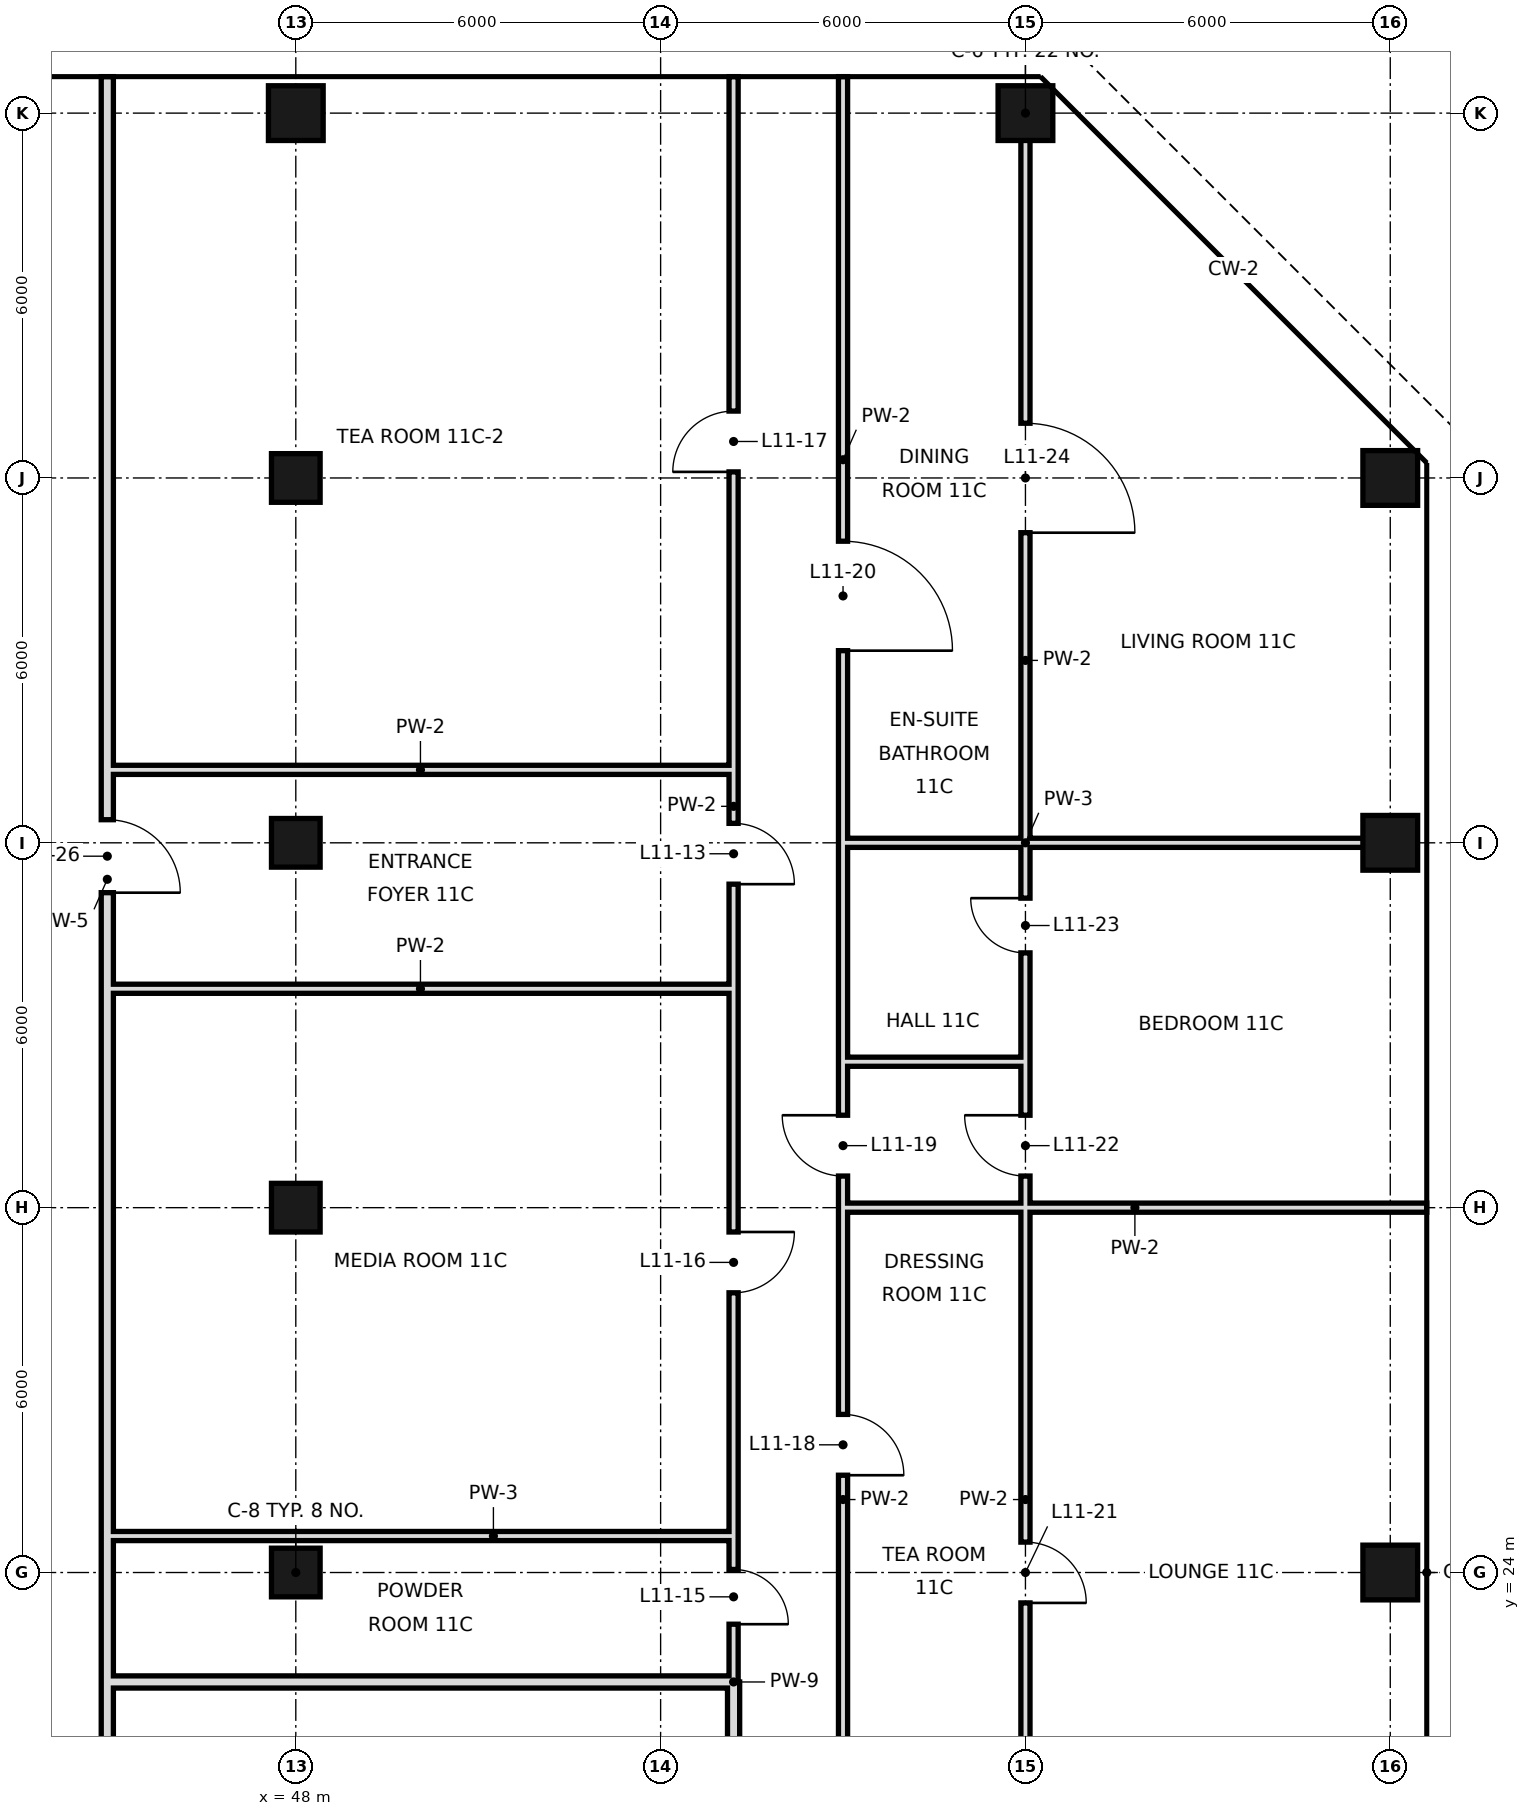
"""IFC4 building model, lengths in metres.
Left out: names, types, materials, properties, quantities, classifications, styles, units other than length and angle.
Written with IfcOpenShell. Run it as: python <this file> out.ifc"""

import sys

from ifc_helpers import new_model, si_unit, direction, frame, frame_2d, origin, origin_2d, place, context, subcontext, project, spatial, rectangle, hollow_rectangle, extrude, element, fill, save


model = new_model("IFC4")
c1 = context("Model", 3, precision=1e-05, world=origin(), true_north=direction((0.0, 1.0)))
c2 = subcontext(c1, "Body", "Model", "MODEL_VIEW")
j1 = project(units=[si_unit("LENGTHUNIT", "METRE"), si_unit("PLANEANGLEUNIT", "RADIAN")], contexts=[c1])
p1 = place(None, origin())
s1 = spatial("IfcSite", under=j1, at=p1, CompositionType="ELEMENT")
p2 = place(p1, origin())
s2 = spatial("IfcBuilding", under=s1, at=p2, CompositionType="ELEMENT")
p3 = place(p2, frame((0.0, 0.0, 60.6)))
s3 = spatial("IfcBuildingStorey", under=s2, at=p3, CompositionType="ELEMENT", Elevation=60.6)
for number, where, z_axis, x_axis in (
    (1, (48.0, 24.0, 0.0), (0.0, 0.0, 1.0), (1.0, 0.0, 0.0)),
    (2, (48.0, 30.0, 0.0), (0.0, 0.0, 1.0), (1.0, 0.0, 0.0)),
    (3, (48.0, 36.0, 0.0), (0.0, 0.0, 1.0), (1.0, 0.0, 0.0)),
    (4, (48.0, 42.0, 0.0), (0.0, 0.0, 1.0), (1.0, 0.0, 0.0)),
):
    element("IfcColumn", number, at=place(p3, frame(where, z_axis=z_axis, x_axis=x_axis)), inside=s3, PredefinedType="COLUMN", context=c2, shape_type="SweptSolid", body=[
        extrude(hollow_rectangle(XDim=0.8, YDim=0.8, WallThickness=0.04, at=origin_2d()), origin(), (0.0, 0.0, 1.0), 3.6),
    ])
for number, where, z_axis, x_axis in (
    (5, (48.0, 48.0, 0.0), (0.0, 0.0, 1.0), (1.0, 0.0, 0.0)),
    (6, (60.0, 48.0, 0.0), (0.0, 0.0, 1.0), (1.0, 0.0, 0.0)),
    (7, (66.0, 24.0, 0.0), (0.0, 0.0, 1.0), (1.0, 0.0, 0.0)),
    (8, (66.0, 36.0, 0.0), (0.0, 0.0, 1.0), (1.0, 0.0, 0.0)),
    (9, (66.0, 42.0, 0.0), (0.0, 0.0, 1.0), (1.0, 0.0, 0.0)),
):
    element("IfcColumn", number, at=place(p3, frame(where, z_axis=z_axis, x_axis=x_axis)), inside=s3, PredefinedType="COLUMN", context=c2, shape_type="SweptSolid", body=[
        extrude(hollow_rectangle(XDim=0.9, YDim=0.9, WallThickness=0.045, at=origin_2d()), origin(), (0.0, 0.0, 1.0), 3.6),
    ])
p4 = place(p3, frame((44.9, 22.2, 0.0), z_axis=(0.0, 0.0, 1.0), x_axis=(0.0, 1.0, 0.0)))
e10 = element("IfcWall", 10, at=p4, inside=s3, PredefinedType="SOLIDWALL", context=c2, shape_type="SweptSolid", body=[
    extrude(rectangle(XDim=26.4, YDim=0.2, at=frame_2d((13.2, 0.0))), origin(), (0.0, 0.0, 1.0), 2.72),
])
p5 = place(p4, frame((12.98, 0.0, 0.0)))
e11 = element("IfcOpeningElement", 11, at=p5, cuts=e10, PredefinedType="OPENING", context=c2, shape_type="SweptSolid", body=[
    extrude(rectangle(XDim=1.2, YDim=2.4, at=frame_2d((0.6, 1.2))), frame((0.0, 0.11, 0.0), z_axis=(0.0, -1.0, 0.0), x_axis=(1.0, 0.0, 0.0)), (0.0, 0.0, 1.0), 0.22),
])
p6 = place(p3, frame((44.9, 18.0, 0.0), z_axis=(0.0, 0.0, 1.0), x_axis=(0.0, 1.0, 0.0)))
e12 = element("IfcWall", 12, at=p6, inside=s3, PredefinedType="SOLIDWALL", context=c2, shape_type="SweptSolid", body=[
    extrude(rectangle(XDim=4.2, YDim=0.2, at=frame_2d((2.1, 0.0))), origin(), (0.0, 0.0, 1.0), 2.97),
])
p7 = place(p3, frame((55.2, 18.0, 0.0), z_axis=(0.0, 0.0, 1.0), x_axis=(0.0, 1.0, 0.0)))
e13 = element("IfcWall", 13, at=p7, inside=s3, PredefinedType="SOLIDWALL", context=c2, shape_type="SweptSolid", body=[
    extrude(rectangle(XDim=4.2, YDim=0.2, at=frame_2d((2.1, 0.0))), origin(), (0.0, 0.0, 1.0), 2.52),
])
p8 = place(p7, frame((1.06, 0.0, 0.0)))
e14 = element("IfcOpeningElement", 14, at=p8, cuts=e13, PredefinedType="OPENING", context=c2, shape_type="SweptSolid", body=[
    extrude(rectangle(XDim=1.0, YDim=2.4, at=frame_2d((0.5, 1.2))), frame((0.0, 0.11, 0.0), z_axis=(0.0, -1.0, 0.0), x_axis=(1.0, 0.0, 0.0)), (0.0, 0.0, 1.0), 0.22),
])
p9 = place(p3, frame((55.2, 24.6, 0.0), z_axis=(0.0, 0.0, 1.0), x_axis=(0.0, 1.0, 0.0)))
e15 = element("IfcWall", 15, at=p9, inside=s3, PredefinedType="PARTITIONING", context=c2, shape_type="SweptSolid", body=[
    extrude(rectangle(XDim=24.0, YDim=0.15, at=frame_2d((12.0, 0.0))), origin(), (0.0, 0.0, 1.0), 3.42),
])
p10 = place(p9, frame((10.72, 0.0, 0.0)))
e16 = element("IfcOpeningElement", 16, at=p10, cuts=e15, PredefinedType="OPENING", context=c2, shape_type="SweptSolid", body=[
    extrude(rectangle(XDim=1.0, YDim=2.4, at=frame_2d((0.5, 1.2))), frame((0.0, 0.085, 0.0), z_axis=(0.0, -1.0, 0.0), x_axis=(1.0, 0.0, 0.0)), (0.0, 0.0, 1.0), 0.17),
])
p11 = place(p9, frame((4.0, 0.0, 0.0)))
e17 = element("IfcOpeningElement", 17, at=p11, cuts=e15, PredefinedType="OPENING", context=c2, shape_type="SweptSolid", body=[
    extrude(rectangle(XDim=1.0, YDim=2.4, at=frame_2d((0.5, 1.2))), frame((0.0, 0.085, 0.0), z_axis=(0.0, -1.0, 0.0), x_axis=(1.0, 0.0, 0.0)), (0.0, 0.0, 1.0), 0.17),
])
p12 = place(p9, frame((17.5, 0.0, 0.0)))
e18 = element("IfcOpeningElement", 18, at=p12, cuts=e15, PredefinedType="OPENING", context=c2, shape_type="SweptSolid", body=[
    extrude(rectangle(XDim=1.0, YDim=2.4, at=frame_2d((0.5, 1.2))), frame((0.0, 0.085, 0.0), z_axis=(0.0, -1.0, 0.0), x_axis=(1.0, 0.0, 0.0)), (0.0, 0.0, 1.0), 0.17),
])
p13 = place(p3, frame((55.2, 22.2, 0.0), z_axis=(0.0, 0.0, 1.0), x_axis=(0.0, 1.0, 0.0)))
e19 = element("IfcWall", 19, at=p13, inside=s3, PredefinedType="PARTITIONING", context=c2, shape_type="SweptSolid", body=[
    extrude(rectangle(XDim=2.4, YDim=0.15, at=frame_2d((1.2, 0.0))), origin(), (0.0, 0.0, 1.0), 3.42),
])
p14 = place(p13, frame((0.95, 0.0, 0.0)))
e20 = element("IfcOpeningElement", 20, at=p14, cuts=e19, PredefinedType="OPENING", context=c2, shape_type="SweptSolid", body=[
    extrude(rectangle(XDim=0.9, YDim=2.4, at=frame_2d((0.45, 1.2))), frame((0.0, 0.085, 0.0), z_axis=(0.0, -1.0, 0.0), x_axis=(1.0, 0.0, 0.0)), (0.0, 0.0, 1.0), 0.17),
])
p15 = place(p3, frame((57.0, 18.0, 0.0), z_axis=(0.0, 0.0, 1.0), x_axis=(0.0, 1.0, 0.0)))
e21 = element("IfcWall", 21, at=p15, inside=s3, PredefinedType="PARTITIONING", context=c2, shape_type="SweptSolid", body=[
    extrude(rectangle(XDim=14.4, YDim=0.15, at=frame_2d((7.2, 0.0))), origin(), (0.0, 0.0, 1.0), 3.42),
])
p16 = place(p15, frame((7.6, 0.0, 0.0)))
e22 = element("IfcOpeningElement", 22, at=p16, cuts=e21, PredefinedType="OPENING", context=c2, shape_type="SweptSolid", body=[
    extrude(rectangle(XDim=1.0, YDim=2.4, at=frame_2d((0.5, 1.2))), frame((0.0, 0.085, 0.0), z_axis=(0.0, -1.0, 0.0), x_axis=(1.0, 0.0, 0.0)), (0.0, 0.0, 1.0), 0.17),
])
p17 = place(p15, frame((12.52, 0.0, 0.0)))
e23 = element("IfcOpeningElement", 23, at=p17, cuts=e21, PredefinedType="OPENING", context=c2, shape_type="SweptSolid", body=[
    extrude(rectangle(XDim=1.0, YDim=2.4, at=frame_2d((0.5, 1.2))), frame((0.0, 0.085, 0.0), z_axis=(0.0, -1.0, 0.0), x_axis=(1.0, 0.0, 0.0)), (0.0, 0.0, 1.0), 0.17),
])
p18 = place(p3, frame((57.0, 36.0, 0.0), z_axis=(0.0, 0.0, 1.0), x_axis=(0.0, 1.0, 0.0)))
e24 = element("IfcWall", 24, at=p18, inside=s3, PredefinedType="PARTITIONING", context=c2, shape_type="SweptSolid", body=[
    extrude(rectangle(XDim=12.6, YDim=0.15, at=frame_2d((6.3, 0.0))), origin(), (0.0, 0.0, 1.0), 3.42),
])
p19 = place(p18, frame((3.16, 0.0, 0.0)))
e25 = element("IfcOpeningElement", 25, at=p19, cuts=e24, PredefinedType="OPENING", context=c2, shape_type="SweptSolid", body=[
    extrude(rectangle(XDim=1.8, YDim=2.4, at=frame_2d((0.9, 1.2))), frame((0.0, 0.085, 0.0), z_axis=(0.0, -1.0, 0.0), x_axis=(1.0, 0.0, 0.0)), (0.0, 0.0, 1.0), 0.17),
])
p20 = place(p3, frame((57.0, 32.4, 0.0), z_axis=(0.0, 0.0, 1.0), x_axis=(0.0, 1.0, 0.0)))
e26 = element("IfcWall", 26, at=p20, inside=s3, PredefinedType="PARTITIONING", context=c2, shape_type="SweptSolid", body=[
    extrude(rectangle(XDim=3.6, YDim=0.15, at=frame_2d((1.8, 0.0))), origin(), (0.0, 0.0, 1.0), 3.42),
])
p21 = place(p3, frame((60.0, 18.0, 0.0), z_axis=(0.0, 0.0, 1.0), x_axis=(0.0, 1.0, 0.0)))
e27 = element("IfcWall", 27, at=p21, inside=s3, PredefinedType="PARTITIONING", context=c2, shape_type="SweptSolid", body=[
    extrude(rectangle(XDim=14.4, YDim=0.15, at=frame_2d((7.2, 0.0))), origin(), (0.0, 0.0, 1.0), 3.42),
])
p22 = place(p21, frame((5.5, 0.0, 0.0)))
e28 = element("IfcOpeningElement", 28, at=p22, cuts=e27, PredefinedType="OPENING", context=c2, shape_type="SweptSolid", body=[
    extrude(rectangle(XDim=1.0, YDim=2.4, at=frame_2d((0.5, 1.2))), frame((0.0, 0.085, 0.0), z_axis=(0.0, -1.0, 0.0), x_axis=(1.0, 0.0, 0.0)), (0.0, 0.0, 1.0), 0.17),
])
p23 = place(p21, frame((12.52, 0.0, 0.0)))
e29 = element("IfcOpeningElement", 29, at=p23, cuts=e27, PredefinedType="OPENING", context=c2, shape_type="SweptSolid", body=[
    extrude(rectangle(XDim=1.0, YDim=2.4, at=frame_2d((0.5, 1.2))), frame((0.0, 0.085, 0.0), z_axis=(0.0, -1.0, 0.0), x_axis=(1.0, 0.0, 0.0)), (0.0, 0.0, 1.0), 0.17),
])
p24 = place(p3, frame((60.0, 36.0, 0.0), z_axis=(0.0, 0.0, 1.0), x_axis=(0.0, 1.0, 0.0)))
e30 = element("IfcWall", 30, at=p24, inside=s3, PredefinedType="PARTITIONING", context=c2, shape_type="SweptSolid", body=[
    extrude(rectangle(XDim=12.0, YDim=0.15, at=frame_2d((6.0, 0.0))), origin(), (0.0, 0.0, 1.0), 3.42),
])
p25 = place(p24, frame((5.1, 0.0, 0.0)))
e31 = element("IfcOpeningElement", 31, at=p25, cuts=e30, PredefinedType="OPENING", context=c2, shape_type="SweptSolid", body=[
    extrude(rectangle(XDim=1.8, YDim=2.4, at=frame_2d((0.9, 1.2))), frame((0.0, 0.085, 0.0), z_axis=(0.0, -1.0, 0.0), x_axis=(1.0, 0.0, 0.0)), (0.0, 0.0, 1.0), 0.17),
])
p26 = place(p3, frame((60.0, 32.4, 0.0), z_axis=(0.0, 0.0, 1.0), x_axis=(0.0, 1.0, 0.0)))
e32 = element("IfcWall", 32, at=p26, inside=s3, PredefinedType="PARTITIONING", context=c2, shape_type="SweptSolid", body=[
    extrude(rectangle(XDim=3.6, YDim=0.15, at=frame_2d((1.8, 0.0))), origin(), (0.0, 0.0, 1.0), 3.42),
])
p27 = place(p26, frame((1.79, 0.0, 0.0)))
e33 = element("IfcOpeningElement", 33, at=p27, cuts=e32, PredefinedType="OPENING", context=c2, shape_type="SweptSolid", body=[
    extrude(rectangle(XDim=0.9, YDim=2.4, at=frame_2d((0.45, 1.2))), frame((0.0, 0.085, 0.0), z_axis=(0.0, -1.0, 0.0), x_axis=(1.0, 0.0, 0.0)), (0.0, 0.0, 1.0), 0.17),
])
p28 = place(p3, frame((44.9, 22.2, 0.0), z_axis=(0.0, 0.0, 1.0), x_axis=(1.0, 0.0, 0.0)))
e34 = element("IfcWall", 34, at=p28, inside=s3, PredefinedType="SOLIDWALL", context=c2, shape_type="SweptSolid", body=[
    extrude(rectangle(XDim=10.3, YDim=0.2, at=frame_2d((5.15, 0.0))), origin(), (0.0, 0.0, 1.0), 2.72),
])
p29 = place(p3, frame((44.9, 24.6, 0.0), z_axis=(0.0, 0.0, 1.0), x_axis=(1.0, 0.0, 0.0)))
e35 = element("IfcWall", 35, at=p29, inside=s3, PredefinedType="PARTITIONING", context=c2, shape_type="SweptSolid", body=[
    extrude(rectangle(XDim=10.3, YDim=0.15, at=frame_2d((5.15, 0.0))), origin(), (0.0, 0.0, 1.0), 3.42),
])
p30 = place(p3, frame((57.0, 30.0, 0.0), z_axis=(0.0, 0.0, 1.0), x_axis=(1.0, 0.0, 0.0)))
e36 = element("IfcWall", 36, at=p30, inside=s3, PredefinedType="PARTITIONING", context=c2, shape_type="SweptSolid", body=[
    extrude(rectangle(XDim=9.6, YDim=0.15, at=frame_2d((4.8, 0.0))), origin(), (0.0, 0.0, 1.0), 2.52),
])
p31 = place(p3, frame((57.0, 32.4, 0.0), z_axis=(0.0, 0.0, 1.0), x_axis=(1.0, 0.0, 0.0)))
e37 = element("IfcWall", 37, at=p31, inside=s3, PredefinedType="PARTITIONING", context=c2, shape_type="SweptSolid", body=[
    extrude(rectangle(XDim=3.0, YDim=0.15, at=frame_2d((1.5, 0.0))), origin(), (0.0, 0.0, 1.0), 3.42),
])
p32 = place(p3, frame((44.9, 33.6, 0.0), z_axis=(0.0, 0.0, 1.0), x_axis=(1.0, 0.0, 0.0)))
e38 = element("IfcWall", 38, at=p32, inside=s3, PredefinedType="PARTITIONING", context=c2, shape_type="SweptSolid", body=[
    extrude(rectangle(XDim=10.3, YDim=0.15, at=frame_2d((5.15, 0.0))), origin(), (0.0, 0.0, 1.0), 3.42),
])
p33 = place(p3, frame((60.0, 36.0, 0.0), z_axis=(0.0, 0.0, 1.0), x_axis=(1.0, 0.0, 0.0)))
e39 = element("IfcWall", 39, at=p33, inside=s3, PredefinedType="PARTITIONING", context=c2, shape_type="SweptSolid", body=[
    extrude(rectangle(XDim=6.0, YDim=0.15, at=frame_2d((3.0, 0.0))), origin(), (0.0, 0.0, 1.0), 2.52),
])
p34 = place(p3, frame((57.0, 36.0, 0.0), z_axis=(0.0, 0.0, 1.0), x_axis=(1.0, 0.0, 0.0)))
e40 = element("IfcWall", 40, at=p34, inside=s3, PredefinedType="PARTITIONING", context=c2, shape_type="SweptSolid", body=[
    extrude(rectangle(XDim=3.0, YDim=0.15, at=frame_2d((1.5, 0.0))), origin(), (0.0, 0.0, 1.0), 2.52),
])
p35 = place(p3, frame((44.9, 37.2, 0.0), z_axis=(0.0, 0.0, 1.0), x_axis=(1.0, 0.0, 0.0)))
e41 = element("IfcWall", 41, at=p35, inside=s3, PredefinedType="PARTITIONING", context=c2, shape_type="SweptSolid", body=[
    extrude(rectangle(XDim=10.3, YDim=0.15, at=frame_2d((5.15, 0.0))), origin(), (0.0, 0.0, 1.0), 3.42),
])
p36 = place(p10, frame((1.0, 0.0, 0.0), z_axis=(0.0, 0.0, 1.0), x_axis=(-1.0, 0.0, 0.0)))
e42 = element("IfcDoor", 42, at=p36, inside=s3, OperationType="SINGLE_SWING_RIGHT", PredefinedType="DOOR", context=c2, shape_type="SweptSolid", body=[
    extrude(rectangle(XDim=1.0, YDim=2.4, at=frame_2d((0.5, 1.2))), frame((0.0, 0.025, 0.0), z_axis=(0.0, -1.0, 0.0), x_axis=(1.0, 0.0, 0.0)), (0.0, 0.0, 1.0), 0.05),
])
fill(e16, e42)
p37 = place(p14, frame((0.9, 0.0, 0.0), z_axis=(0.0, 0.0, 1.0), x_axis=(-1.0, 0.0, 0.0)))
e43 = element("IfcDoor", 43, at=p37, inside=s3, OperationType="SINGLE_SWING_RIGHT", PredefinedType="DOOR", context=c2, shape_type="SweptSolid", body=[
    extrude(rectangle(XDim=0.9, YDim=2.4, at=frame_2d((0.45, 1.2))), frame((0.0, 0.025, 0.0), z_axis=(0.0, -1.0, 0.0), x_axis=(1.0, 0.0, 0.0)), (0.0, 0.0, 1.0), 0.05),
])
fill(e20, e43)
p38 = place(p11, origin())
e44 = element("IfcDoor", 44, at=p38, inside=s3, OperationType="SINGLE_SWING_RIGHT", PredefinedType="DOOR", context=c2, shape_type="SweptSolid", body=[
    extrude(rectangle(XDim=1.0, YDim=2.4, at=frame_2d((0.5, 1.2))), frame((0.0, 0.025, 0.0), z_axis=(0.0, -1.0, 0.0), x_axis=(1.0, 0.0, 0.0)), (0.0, 0.0, 1.0), 0.05),
])
fill(e17, e44)
p39 = place(p12, origin())
e45 = element("IfcDoor", 45, at=p39, inside=s3, OperationType="SINGLE_SWING_LEFT", PredefinedType="DOOR", context=c2, shape_type="SweptSolid", body=[
    extrude(rectangle(XDim=1.0, YDim=2.4, at=frame_2d((0.5, 1.2))), frame((0.0, 0.025, 0.0), z_axis=(0.0, -1.0, 0.0), x_axis=(1.0, 0.0, 0.0)), (0.0, 0.0, 1.0), 0.05),
])
fill(e18, e45)
p40 = place(p16, frame((1.0, 0.0, 0.0), z_axis=(0.0, 0.0, 1.0), x_axis=(-1.0, 0.0, 0.0)))
e46 = element("IfcDoor", 46, at=p40, inside=s3, OperationType="SINGLE_SWING_RIGHT", PredefinedType="DOOR", context=c2, shape_type="SweptSolid", body=[
    extrude(rectangle(XDim=1.0, YDim=2.4, at=frame_2d((0.5, 1.2))), frame((0.0, 0.025, 0.0), z_axis=(0.0, -1.0, 0.0), x_axis=(1.0, 0.0, 0.0)), (0.0, 0.0, 1.0), 0.05),
])
fill(e22, e46)
p41 = place(p17, frame((1.0, 0.0, 0.0), z_axis=(0.0, 0.0, 1.0), x_axis=(-1.0, 0.0, 0.0)))
e47 = element("IfcDoor", 47, at=p41, inside=s3, OperationType="SINGLE_SWING_LEFT", PredefinedType="DOOR", context=c2, shape_type="SweptSolid", body=[
    extrude(rectangle(XDim=1.0, YDim=2.4, at=frame_2d((0.5, 1.2))), frame((0.0, 0.025, 0.0), z_axis=(0.0, -1.0, 0.0), x_axis=(1.0, 0.0, 0.0)), (0.0, 0.0, 1.0), 0.05),
])
fill(e23, e47)
p42 = place(p19, frame((1.8, 0.0, 0.0), z_axis=(0.0, 0.0, 1.0), x_axis=(-1.0, 0.0, 0.0)))
e48 = element("IfcDoor", 48, at=p42, inside=s3, OperationType="SINGLE_SWING_RIGHT", PredefinedType="DOOR", context=c2, shape_type="SweptSolid", body=[
    extrude(rectangle(XDim=1.8, YDim=2.4, at=frame_2d((0.9, 1.2))), frame((0.0, 0.025, 0.0), z_axis=(0.0, -1.0, 0.0), x_axis=(1.0, 0.0, 0.0)), (0.0, 0.0, 1.0), 0.05),
])
fill(e25, e48)
p43 = place(p22, frame((1.0, 0.0, 0.0), z_axis=(0.0, 0.0, 1.0), x_axis=(-1.0, 0.0, 0.0)))
e49 = element("IfcDoor", 49, at=p43, inside=s3, OperationType="SINGLE_SWING_RIGHT", PredefinedType="DOOR", context=c2, shape_type="SweptSolid", body=[
    extrude(rectangle(XDim=1.0, YDim=2.4, at=frame_2d((0.5, 1.2))), frame((0.0, 0.025, 0.0), z_axis=(0.0, -1.0, 0.0), x_axis=(1.0, 0.0, 0.0)), (0.0, 0.0, 1.0), 0.05),
])
fill(e28, e49)
p44 = place(p23, frame((1.0, 0.0, 0.0), z_axis=(0.0, 0.0, 1.0), x_axis=(-1.0, 0.0, 0.0)))
e50 = element("IfcDoor", 50, at=p44, inside=s3, OperationType="SINGLE_SWING_LEFT", PredefinedType="DOOR", context=c2, shape_type="SweptSolid", body=[
    extrude(rectangle(XDim=1.0, YDim=2.4, at=frame_2d((0.5, 1.2))), frame((0.0, 0.025, 0.0), z_axis=(0.0, -1.0, 0.0), x_axis=(1.0, 0.0, 0.0)), (0.0, 0.0, 1.0), 0.05),
])
fill(e29, e50)
p45 = place(p27, frame((0.9, 0.0, 0.0), z_axis=(0.0, 0.0, 1.0), x_axis=(-1.0, 0.0, 0.0)))
e51 = element("IfcDoor", 51, at=p45, inside=s3, OperationType="SINGLE_SWING_LEFT", PredefinedType="DOOR", context=c2, shape_type="SweptSolid", body=[
    extrude(rectangle(XDim=0.9, YDim=2.4, at=frame_2d((0.45, 1.2))), frame((0.0, 0.025, 0.0), z_axis=(0.0, -1.0, 0.0), x_axis=(1.0, 0.0, 0.0)), (0.0, 0.0, 1.0), 0.05),
])
fill(e33, e51)
p46 = place(p25, frame((1.8, 0.0, 0.0), z_axis=(0.0, 0.0, 1.0), x_axis=(-1.0, 0.0, 0.0)))
e52 = element("IfcDoor", 52, at=p46, inside=s3, OperationType="SINGLE_SWING_RIGHT", PredefinedType="DOOR", context=c2, shape_type="SweptSolid", body=[
    extrude(rectangle(XDim=1.8, YDim=2.4, at=frame_2d((0.9, 1.2))), frame((0.0, 0.025, 0.0), z_axis=(0.0, -1.0, 0.0), x_axis=(1.0, 0.0, 0.0)), (0.0, 0.0, 1.0), 0.05),
])
fill(e31, e52)
p47 = place(p5, frame((1.2, 0.0, 0.0), z_axis=(0.0, 0.0, 1.0), x_axis=(-1.0, 0.0, 0.0)))
e53 = element("IfcDoor", 53, at=p47, inside=s3, OperationType="SINGLE_SWING_RIGHT", PredefinedType="DOOR", context=c2, shape_type="SweptSolid", body=[
    extrude(rectangle(XDim=1.2, YDim=2.4, at=frame_2d((0.6, 1.2))), frame((0.0, 0.025, 0.0), z_axis=(0.0, -1.0, 0.0), x_axis=(1.0, 0.0, 0.0)), (0.0, 0.0, 1.0), 0.05),
])
fill(e11, e53)
save(model, sys.argv[1])
